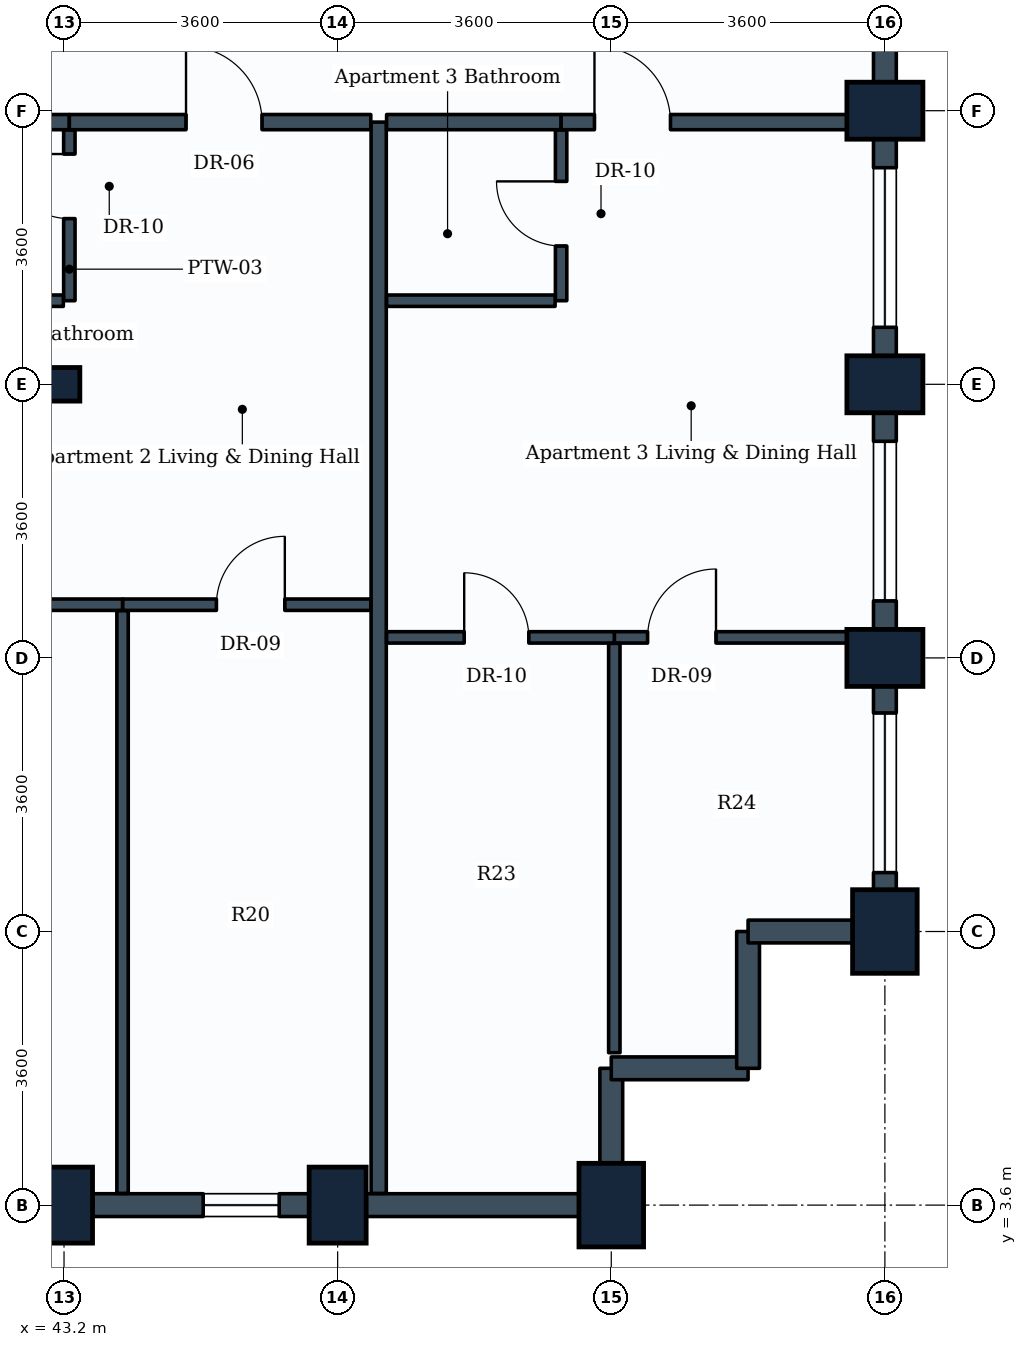
"""IFC4 building model, lengths in metres.
Left out: names, types, materials, properties, quantities, classifications, styles, units other than length and angle.
Written with IfcOpenShell. Run it as: python <this file> out.ifc"""

import sys

from ifc_helpers import new_model, si_unit, direction, frame, frame_2d, origin, origin_2d, place, context, subcontext, project, spatial, rectangle, i_section, extrude, element, fill, save


model = new_model("IFC4")
c1 = context("Model", 3, precision=1e-05, world=origin(), true_north=direction((0.0, 1.0)))
c2 = subcontext(c1, "Body", "Model", "MODEL_VIEW")
j1 = project(units=[si_unit("LENGTHUNIT", "METRE"), si_unit("PLANEANGLEUNIT", "RADIAN")], contexts=[c1])
p1 = place(None, origin())
s1 = spatial("IfcSite", under=j1, at=p1, CompositionType="ELEMENT")
p2 = place(p1, origin())
s2 = spatial("IfcBuilding", under=s1, at=p2, CompositionType="ELEMENT")
p3 = place(p2, frame((0.0, 0.0, 146.6)))
s3 = spatial("IfcBuildingStorey", under=s2, at=p3, CompositionType="ELEMENT", Elevation=146.6)
p4 = place(p3, frame((43.2, 3.6, 0.0), z_axis=(0.0, 0.0, 1.0), x_axis=(1.0, 0.0, 0.0)))
e1 = element("IfcColumn", 1, at=p4, inside=s3, PredefinedType="COLUMN", context=c2, shape_type="SweptSolid", body=[
    extrude(rectangle(XDim=0.75, YDim=1.0, at=origin_2d()), origin(), (0.0, 0.0, 1.0), 3.8),
])
p5 = place(p3, frame((43.2, 14.4, 0.0), z_axis=(0.0, 0.0, 1.0), x_axis=(1.0, 0.0, 0.0)))
e2 = element("IfcColumn", 2, at=p5, inside=s3, PredefinedType="COLUMN", context=c2, shape_type="SweptSolid", body=[
    extrude(i_section(OverallWidth=0.416, OverallDepth=0.442, WebThickness=0.025, FlangeThickness=0.041, FilletRadius=0.015, at=origin_2d()), origin(), (0.0, 0.0, 1.0), 3.8),
])
p6 = place(p3, frame((46.8, 3.6, 0.0), z_axis=(0.0, 0.0, 1.0), x_axis=(1.0, 0.0, 0.0)))
e3 = element("IfcColumn", 3, at=p6, inside=s3, PredefinedType="COLUMN", context=c2, shape_type="SweptSolid", body=[
    extrude(rectangle(XDim=0.75, YDim=1.0, at=origin_2d()), origin(), (0.0, 0.0, 1.0), 3.8),
])
for number, where, z_axis, x_axis in (
    (4, (50.4, 3.6, 0.0), (0.0, 0.0, 1.0), (1.0, 0.0, 0.0)),
    (5, (54.0, 7.2, 0.0), (0.0, 0.0, 1.0), (1.0, 0.0, 0.0)),
):
    element("IfcColumn", number, at=place(p3, frame(where, z_axis=z_axis, x_axis=x_axis)), inside=s3, PredefinedType="COLUMN", context=c2, shape_type="SweptSolid", body=[
        extrude(rectangle(XDim=0.85, YDim=1.1, at=origin_2d()), origin(), (0.0, 0.0, 1.0), 3.8),
    ])
for number, where, z_axis, x_axis in (
    (6, (54.0, 10.8, 0.0), (0.0, 0.0, 1.0), (0.0, 1.0, 0.0)),
    (7, (54.0, 14.4, 0.0), (0.0, 0.0, 1.0), (0.0, 1.0, 0.0)),
    (8, (54.0, 18.0, 0.0), (0.0, 0.0, 1.0), (0.0, 1.0, 0.0)),
):
    element("IfcColumn", number, at=place(p3, frame(where, z_axis=z_axis, x_axis=x_axis)), inside=s3, PredefinedType="COLUMN", context=c2, shape_type="SweptSolid", body=[
        extrude(rectangle(XDim=0.75, YDim=1.0, at=origin_2d()), origin(), (0.0, 0.0, 1.0), 3.8),
    ])
p7 = place(p3, frame((43.2, 3.6, 0.0), z_axis=(0.0, 0.0, 1.0), x_axis=(-1.0, 0.0, 0.0)))
e9 = element("IfcWall", 9, at=p7, inside=s3, PredefinedType="STANDARD", context=c2, shape_type="SweptSolid", body=[
    extrude(rectangle(XDim=3.6, YDim=0.3, at=frame_2d((1.8, 0.0))), origin(), (0.0, 0.0, 1.0), 2.93),
])
p8 = place(p3, frame((46.8, 3.6, 0.0), z_axis=(0.0, 0.0, 1.0), x_axis=(-1.0, 0.0, 0.0)))
e10 = element("IfcWall", 10, at=p8, inside=s3, PredefinedType="STANDARD", context=c2, shape_type="SweptSolid", body=[
    extrude(rectangle(XDim=3.6, YDim=0.3, at=frame_2d((1.8, 0.0))), origin(), (0.0, 0.0, 1.0), 2.93),
])
p9 = place(p8, frame((0.769, 0.0, 0.85)))
e11 = element("IfcOpeningElement", 11, at=p9, cuts=e10, PredefinedType="OPENING", context=c2, shape_type="SweptSolid", body=[
    extrude(rectangle(XDim=1.0, YDim=1.35, at=frame_2d((0.5, 0.675))), frame((0.0, 0.16, 0.0), z_axis=(0.0, -1.0, 0.0), x_axis=(1.0, 0.0, 0.0)), (0.0, 0.0, 1.0), 0.32),
])
p10 = place(p3, frame((50.4, 3.6, 0.0), z_axis=(0.0, 0.0, 1.0), x_axis=(-1.0, 0.0, 0.0)))
e12 = element("IfcWall", 12, at=p10, inside=s3, PredefinedType="STANDARD", context=c2, shape_type="SweptSolid", body=[
    extrude(rectangle(XDim=3.6, YDim=0.3, at=frame_2d((1.8, 0.0))), origin(), (0.0, 0.0, 1.0), 2.93),
])
p11 = place(p3, frame((50.4, 5.4, 0.0), z_axis=(0.0, 0.0, 1.0), x_axis=(0.0, -1.0, 0.0)))
e13 = element("IfcWall", 13, at=p11, inside=s3, PredefinedType="STANDARD", context=c2, shape_type="SweptSolid", body=[
    extrude(rectangle(XDim=1.8, YDim=0.3, at=frame_2d((0.9, 0.0))), origin(), (0.0, 0.0, 1.0), 2.93),
])
for number, where, z_axis, x_axis in (
    (14, (52.2, 5.4, 0.0), (0.0, 0.0, 1.0), (-1.0, 0.0, 0.0)),
    (15, (52.2, 7.2, 0.0), (0.0, 0.0, 1.0), (0.0, -1.0, 0.0)),
):
    element("IfcWall", number, at=place(p3, frame(where, z_axis=z_axis, x_axis=x_axis)), inside=s3, PredefinedType="STANDARD", context=c2, shape_type="SweptSolid", body=[
        extrude(rectangle(XDim=1.8, YDim=0.3, at=frame_2d((0.9, 0.0))), origin(), (0.0, 0.0, 1.0), 3.535),
    ])
p12 = place(p3, frame((54.0, 7.2, 0.0), z_axis=(0.0, 0.0, 1.0), x_axis=(-1.0, 0.0, 0.0)))
e16 = element("IfcWall", 16, at=p12, inside=s3, PredefinedType="STANDARD", context=c2, shape_type="SweptSolid", body=[
    extrude(rectangle(XDim=1.8, YDim=0.3, at=frame_2d((0.9, 0.0))), origin(), (0.0, 0.0, 1.0), 2.93),
])
p13 = place(p3, frame((54.0, 10.8, 0.0), z_axis=(0.0, 0.0, 1.0), x_axis=(0.0, -1.0, 0.0)))
e17 = element("IfcWall", 17, at=p13, inside=s3, PredefinedType="STANDARD", context=c2, shape_type="SweptSolid", body=[
    extrude(rectangle(XDim=3.6, YDim=0.3, at=frame_2d((1.8, 0.0))), origin(), (0.0, 0.0, 1.0), 2.93),
])
p14 = place(p13, frame((0.725, 0.0, 0.85)))
e18 = element("IfcOpeningElement", 18, at=p14, cuts=e17, PredefinedType="OPENING", context=c2, shape_type="SweptSolid", body=[
    extrude(rectangle(XDim=2.1, YDim=1.35, at=frame_2d((1.05, 0.675))), frame((0.0, 0.16, 0.0), z_axis=(0.0, -1.0, 0.0), x_axis=(1.0, 0.0, 0.0)), (0.0, 0.0, 1.0), 0.32),
])
p15 = place(p3, frame((54.0, 14.4, 0.0), z_axis=(0.0, 0.0, 1.0), x_axis=(0.0, -1.0, 0.0)))
e19 = element("IfcWall", 19, at=p15, inside=s3, PredefinedType="STANDARD", context=c2, shape_type="SweptSolid", body=[
    extrude(rectangle(XDim=3.6, YDim=0.3, at=frame_2d((1.8, 0.0))), origin(), (0.0, 0.0, 1.0), 2.93),
])
p16 = place(p15, frame((0.75, 0.0, 0.85)))
e20 = element("IfcOpeningElement", 20, at=p16, cuts=e19, PredefinedType="OPENING", context=c2, shape_type="SweptSolid", body=[
    extrude(rectangle(XDim=2.1, YDim=1.35, at=frame_2d((1.05, 0.675))), frame((0.0, 0.16, 0.0), z_axis=(0.0, -1.0, 0.0), x_axis=(1.0, 0.0, 0.0)), (0.0, 0.0, 1.0), 0.32),
])
p17 = place(p3, frame((54.0, 18.0, 0.0), z_axis=(0.0, 0.0, 1.0), x_axis=(0.0, -1.0, 0.0)))
e21 = element("IfcWall", 21, at=p17, inside=s3, PredefinedType="STANDARD", context=c2, shape_type="SweptSolid", body=[
    extrude(rectangle(XDim=3.6, YDim=0.3, at=frame_2d((1.8, 0.0))), origin(), (0.0, 0.0, 1.0), 2.93),
])
p18 = place(p17, frame((0.75, 0.0, 0.85)))
e22 = element("IfcOpeningElement", 22, at=p18, cuts=e21, PredefinedType="OPENING", context=c2, shape_type="SweptSolid", body=[
    extrude(rectangle(XDim=2.1, YDim=1.35, at=frame_2d((1.05, 0.675))), frame((0.0, 0.16, 0.0), z_axis=(0.0, -1.0, 0.0), x_axis=(1.0, 0.0, 0.0)), (0.0, 0.0, 1.0), 0.32),
])
p19 = place(p3, frame((54.0, 21.6, 0.0), z_axis=(0.0, 0.0, 1.0), x_axis=(0.0, -1.0, 0.0)))
e23 = element("IfcWall", 23, at=p19, inside=s3, PredefinedType="STANDARD", context=c2, shape_type="SweptSolid", body=[
    extrude(rectangle(XDim=3.6, YDim=0.3, at=frame_2d((1.8, 0.0))), origin(), (0.0, 0.0, 1.0), 2.93),
])
p20 = place(p3, frame((47.34, 3.754, 0.0), z_axis=(0.0, 0.0, 1.0), x_axis=(0.0, 1.0, 0.0)))
e24 = element("IfcWall", 24, at=p20, inside=s3, PredefinedType="PARTITIONING", context=c2, shape_type="SweptSolid", body=[
    extrude(rectangle(XDim=14.096, YDim=0.2, at=frame_2d((7.048, 0.0))), origin(), (0.0, 0.0, 1.0), 2.93),
])
p21 = place(p3, frame((40.974, 17.85, 0.0), z_axis=(0.0, 0.0, 1.0), x_axis=(1.0, 0.0, 0.0)))
e25 = element("IfcWall", 25, at=p21, inside=s3, PredefinedType="PARTITIONING", context=c2, shape_type="SweptSolid", body=[
    extrude(rectangle(XDim=2.296, YDim=0.2, at=frame_2d((1.148, 0.0))), origin(), (0.0, 0.0, 1.0), 3.13),
])
p22 = place(p3, frame((43.27, 15.5, 0.0), z_axis=(0.0, 0.0, 1.0), x_axis=(0.0, 1.0, 0.0)))
e26 = element("IfcWall", 26, at=p22, inside=s3, PredefinedType="PARTITIONING", context=c2, shape_type="SweptSolid", body=[
    extrude(rectangle(XDim=2.246, YDim=0.15, at=frame_2d((1.123, 0.0))), origin(), (0.0, 0.0, 1.0), 3.18),
])
p23 = place(p22, frame((1.08, 0.0, 0.0)))
e27 = element("IfcOpeningElement", 27, at=p23, cuts=e26, PredefinedType="OPENING", context=c2, shape_type="SweptSolid", body=[
    extrude(rectangle(XDim=0.85, YDim=2.1, at=frame_2d((0.425, 1.05))), frame((0.0, 0.085, 0.0), z_axis=(0.0, -1.0, 0.0), x_axis=(1.0, 0.0, 0.0)), (0.0, 0.0, 1.0), 0.17),
])
p24 = place(p3, frame((40.974, 15.5, 0.0), z_axis=(0.0, 0.0, 1.0), x_axis=(1.0, 0.0, 0.0)))
e28 = element("IfcWall", 28, at=p24, inside=s3, PredefinedType="PARTITIONING", context=c2, shape_type="SweptSolid", body=[
    extrude(rectangle(XDim=2.217, YDim=0.15, at=frame_2d((1.108, 0.0))), origin(), (0.0, 0.0, 1.0), 3.18),
])
p25 = place(p3, frame((43.27, 17.85, 0.0), z_axis=(0.0, 0.0, 1.0), x_axis=(1.0, 0.0, 0.0)))
e29 = element("IfcWall", 29, at=p25, inside=s3, PredefinedType="PARTITIONING", context=c2, shape_type="SweptSolid", body=[
    extrude(rectangle(XDim=3.966, YDim=0.2, at=frame_2d((1.983, 0.0))), origin(), (0.0, 0.0, 1.0), 3.17),
])
p26 = place(p25, frame((1.535, 0.0, 0.0)))
e30 = element("IfcOpeningElement", 30, at=p26, cuts=e29, PredefinedType="OPENING", context=c2, shape_type="SweptSolid", body=[
    extrude(rectangle(XDim=1.0, YDim=2.1, at=frame_2d((0.5, 1.05))), frame((0.0, 0.11, 0.0), z_axis=(0.0, -1.0, 0.0), x_axis=(1.0, 0.0, 0.0)), (0.0, 0.0, 1.0), 0.22),
])
p27 = place(p3, frame((43.97, 11.5, 0.0), z_axis=(0.0, 0.0, 1.0), x_axis=(1.0, 0.0, 0.0)))
e31 = element("IfcWall", 31, at=p27, inside=s3, PredefinedType="PARTITIONING", context=c2, shape_type="SweptSolid", body=[
    extrude(rectangle(XDim=3.266, YDim=0.15, at=frame_2d((1.633, 0.0))), origin(), (0.0, 0.0, 1.0), 3.17),
])
p28 = place(p27, frame((1.235, 0.0, 0.0)))
e32 = element("IfcOpeningElement", 32, at=p28, cuts=e31, PredefinedType="OPENING", context=c2, shape_type="SweptSolid", body=[
    extrude(rectangle(XDim=0.9, YDim=2.1, at=frame_2d((0.45, 1.05))), frame((0.0, 0.085, 0.0), z_axis=(0.0, -1.0, 0.0), x_axis=(1.0, 0.0, 0.0)), (0.0, 0.0, 1.0), 0.17),
])
p29 = place(p3, frame((40.974, 11.5, 0.0), z_axis=(0.0, 0.0, 1.0), x_axis=(1.0, 0.0, 0.0)))
e33 = element("IfcWall", 33, at=p29, inside=s3, PredefinedType="PARTITIONING", context=c2, shape_type="SweptSolid", body=[
    extrude(rectangle(XDim=2.996, YDim=0.15, at=frame_2d((1.498, 0.0))), origin(), (0.0, 0.0, 1.0), 3.18),
])
p30 = place(p29, frame((0.333, 0.0, 0.0)))
e34 = element("IfcOpeningElement", 34, at=p30, cuts=e33, PredefinedType="OPENING", context=c2, shape_type="SweptSolid", body=[
    extrude(rectangle(XDim=0.85, YDim=2.1, at=frame_2d((0.425, 1.05))), frame((0.0, 0.085, 0.0), z_axis=(0.0, -1.0, 0.0), x_axis=(1.0, 0.0, 0.0)), (0.0, 0.0, 1.0), 0.17),
])
p31 = place(p3, frame((43.97, 3.754, 0.0), z_axis=(0.0, 0.0, 1.0), x_axis=(0.0, 1.0, 0.0)))
e35 = element("IfcWall", 35, at=p31, inside=s3, PredefinedType="PARTITIONING", context=c2, shape_type="SweptSolid", body=[
    extrude(rectangle(XDim=7.667, YDim=0.15, at=frame_2d((3.833, 0.0))), origin(), (0.0, 0.0, 1.0), 2.93),
])
p32 = place(p3, frame((47.444, 17.85, 0.0), z_axis=(0.0, 0.0, 1.0), x_axis=(1.0, 0.0, 0.0)))
e36 = element("IfcWall", 36, at=p32, inside=s3, PredefinedType="PARTITIONING", context=c2, shape_type="SweptSolid", body=[
    extrude(rectangle(XDim=2.296, YDim=0.2, at=frame_2d((1.148, 0.0))), origin(), (0.0, 0.0, 1.0), 3.535),
])
p33 = place(p3, frame((49.74, 15.5, 0.0), z_axis=(0.0, 0.0, 1.0), x_axis=(0.0, 1.0, 0.0)))
e37 = element("IfcWall", 37, at=p33, inside=s3, PredefinedType="PARTITIONING", context=c2, shape_type="SweptSolid", body=[
    extrude(rectangle(XDim=2.246, YDim=0.15, at=frame_2d((1.123, 0.0))), origin(), (0.0, 0.0, 1.0), 3.535),
])
p34 = place(p33, frame((0.72, 0.0, 0.0)))
e38 = element("IfcOpeningElement", 38, at=p34, cuts=e37, PredefinedType="OPENING", context=c2, shape_type="SweptSolid", body=[
    extrude(rectangle(XDim=0.85, YDim=2.1, at=frame_2d((0.425, 1.05))), frame((0.0, 0.085, 0.0), z_axis=(0.0, -1.0, 0.0), x_axis=(1.0, 0.0, 0.0)), (0.0, 0.0, 1.0), 0.17),
])
p35 = place(p3, frame((47.444, 15.5, 0.0), z_axis=(0.0, 0.0, 1.0), x_axis=(1.0, 0.0, 0.0)))
e39 = element("IfcWall", 39, at=p35, inside=s3, PredefinedType="PARTITIONING", context=c2, shape_type="SweptSolid", body=[
    extrude(rectangle(XDim=2.217, YDim=0.15, at=frame_2d((1.108, 0.0))), origin(), (0.0, 0.0, 1.0), 3.535),
])
p36 = place(p3, frame((49.74, 17.85, 0.0), z_axis=(0.0, 0.0, 1.0), x_axis=(1.0, 0.0, 0.0)))
e40 = element("IfcWall", 40, at=p36, inside=s3, PredefinedType="PARTITIONING", context=c2, shape_type="SweptSolid", body=[
    extrude(rectangle(XDim=4.106, YDim=0.2, at=frame_2d((2.053, 0.0))), origin(), (0.0, 0.0, 1.0), 2.93),
])
p37 = place(p36, frame((0.439, 0.0, 0.0)))
e41 = element("IfcOpeningElement", 41, at=p37, cuts=e40, PredefinedType="OPENING", context=c2, shape_type="SweptSolid", body=[
    extrude(rectangle(XDim=1.0, YDim=2.1, at=frame_2d((0.5, 1.05))), frame((0.0, 0.11, 0.0), z_axis=(0.0, -1.0, 0.0), x_axis=(1.0, 0.0, 0.0)), (0.0, 0.0, 1.0), 0.22),
])
p38 = place(p3, frame((50.44, 11.07, 0.0), z_axis=(0.0, 0.0, 1.0), x_axis=(1.0, 0.0, 0.0)))
e42 = element("IfcWall", 42, at=p38, inside=s3, PredefinedType="PARTITIONING", context=c2, shape_type="SweptSolid", body=[
    extrude(rectangle(XDim=3.406, YDim=0.15, at=frame_2d((1.703, 0.0))), origin(), (0.0, 0.0, 1.0), 2.93),
])
p39 = place(p38, frame((0.438, 0.0, 0.0)))
e43 = element("IfcOpeningElement", 43, at=p39, cuts=e42, PredefinedType="OPENING", context=c2, shape_type="SweptSolid", body=[
    extrude(rectangle(XDim=0.9, YDim=2.1, at=frame_2d((0.45, 1.05))), frame((0.0, 0.085, 0.0), z_axis=(0.0, -1.0, 0.0), x_axis=(1.0, 0.0, 0.0)), (0.0, 0.0, 1.0), 0.17),
])
p40 = place(p3, frame((47.444, 11.07, 0.0), z_axis=(0.0, 0.0, 1.0), x_axis=(1.0, 0.0, 0.0)))
e44 = element("IfcWall", 44, at=p40, inside=s3, PredefinedType="PARTITIONING", context=c2, shape_type="SweptSolid", body=[
    extrude(rectangle(XDim=2.996, YDim=0.15, at=frame_2d((1.498, 0.0))), origin(), (0.0, 0.0, 1.0), 3.535),
])
p41 = place(p40, frame((1.021, 0.0, 0.0)))
e45 = element("IfcOpeningElement", 45, at=p41, cuts=e44, PredefinedType="OPENING", context=c2, shape_type="SweptSolid", body=[
    extrude(rectangle(XDim=0.85, YDim=2.1, at=frame_2d((0.425, 1.05))), frame((0.0, 0.085, 0.0), z_axis=(0.0, -1.0, 0.0), x_axis=(1.0, 0.0, 0.0)), (0.0, 0.0, 1.0), 0.17),
])
p42 = place(p3, frame((50.44, 5.605, 0.0), z_axis=(0.0, 0.0, 1.0), x_axis=(0.0, 1.0, 0.0)))
e46 = element("IfcWall", 46, at=p42, inside=s3, PredefinedType="PARTITIONING", context=c2, shape_type="SweptSolid", body=[
    extrude(rectangle(XDim=5.386, YDim=0.15, at=frame_2d((2.693, 0.0))), origin(), (0.0, 0.0, 1.0), 3.535),
])
p43 = place(p14, origin())
e47 = element("IfcWindow", 47, at=p43, inside=s3, PartitioningType="SINGLE_PANEL", PredefinedType="WINDOW", context=c2, shape_type="SweptSolid", body=[
    extrude(rectangle(XDim=2.1, YDim=1.35, at=frame_2d((1.05, 0.675))), frame((0.0, 0.03, 0.0), z_axis=(0.0, -1.0, 0.0), x_axis=(1.0, 0.0, 0.0)), (0.0, 0.0, 1.0), 0.06),
])
fill(e18, e47)
p44 = place(p16, origin())
e48 = element("IfcWindow", 48, at=p44, inside=s3, PartitioningType="SINGLE_PANEL", PredefinedType="WINDOW", context=c2, shape_type="SweptSolid", body=[
    extrude(rectangle(XDim=2.1, YDim=1.35, at=frame_2d((1.05, 0.675))), frame((0.0, 0.03, 0.0), z_axis=(0.0, -1.0, 0.0), x_axis=(1.0, 0.0, 0.0)), (0.0, 0.0, 1.0), 0.06),
])
fill(e20, e48)
p45 = place(p18, origin())
e49 = element("IfcWindow", 49, at=p45, inside=s3, PartitioningType="SINGLE_PANEL", PredefinedType="WINDOW", context=c2, shape_type="SweptSolid", body=[
    extrude(rectangle(XDim=2.1, YDim=1.35, at=frame_2d((1.05, 0.675))), frame((0.0, 0.03, 0.0), z_axis=(0.0, -1.0, 0.0), x_axis=(1.0, 0.0, 0.0)), (0.0, 0.0, 1.0), 0.06),
])
fill(e22, e49)
p46 = place(p23, origin())
e50 = element("IfcDoor", 50, at=p46, inside=s3, OperationType="SINGLE_SWING_RIGHT", PredefinedType="DOOR", context=c2, shape_type="SweptSolid", body=[
    extrude(rectangle(XDim=0.85, YDim=2.1, at=frame_2d((0.425, 1.05))), frame((0.0, 0.025, 0.0), z_axis=(0.0, -1.0, 0.0), x_axis=(1.0, 0.0, 0.0)), (0.0, 0.0, 1.0), 0.05),
])
fill(e27, e50)
p47 = place(p26, origin())
e51 = element("IfcDoor", 51, at=p47, inside=s3, OperationType="SINGLE_SWING_LEFT", PredefinedType="DOOR", context=c2, shape_type="SweptSolid", body=[
    extrude(rectangle(XDim=1.0, YDim=2.1, at=frame_2d((0.5, 1.05))), frame((0.0, 0.025, 0.0), z_axis=(0.0, -1.0, 0.0), x_axis=(1.0, 0.0, 0.0)), (0.0, 0.0, 1.0), 0.05),
])
fill(e30, e51)
p48 = place(p28, origin())
e52 = element("IfcDoor", 52, at=p48, inside=s3, OperationType="SINGLE_SWING_RIGHT", PredefinedType="DOOR", context=c2, shape_type="SweptSolid", body=[
    extrude(rectangle(XDim=0.9, YDim=2.1, at=frame_2d((0.45, 1.05))), frame((0.0, 0.025, 0.0), z_axis=(0.0, -1.0, 0.0), x_axis=(1.0, 0.0, 0.0)), (0.0, 0.0, 1.0), 0.05),
])
fill(e32, e52)
p49 = place(p34, origin())
e53 = element("IfcDoor", 53, at=p49, inside=s3, OperationType="SINGLE_SWING_RIGHT", PredefinedType="DOOR", context=c2, shape_type="SweptSolid", body=[
    extrude(rectangle(XDim=0.85, YDim=2.1, at=frame_2d((0.425, 1.05))), frame((0.0, 0.025, 0.0), z_axis=(0.0, -1.0, 0.0), x_axis=(1.0, 0.0, 0.0)), (0.0, 0.0, 1.0), 0.05),
])
fill(e38, e53)
p50 = place(p37, origin())
e54 = element("IfcDoor", 54, at=p50, inside=s3, OperationType="SINGLE_SWING_LEFT", PredefinedType="DOOR", context=c2, shape_type="SweptSolid", body=[
    extrude(rectangle(XDim=1.0, YDim=2.1, at=frame_2d((0.5, 1.05))), frame((0.0, 0.025, 0.0), z_axis=(0.0, -1.0, 0.0), x_axis=(1.0, 0.0, 0.0)), (0.0, 0.0, 1.0), 0.05),
])
fill(e41, e54)
p51 = place(p39, origin())
e55 = element("IfcDoor", 55, at=p51, inside=s3, OperationType="SINGLE_SWING_RIGHT", PredefinedType="DOOR", context=c2, shape_type="SweptSolid", body=[
    extrude(rectangle(XDim=0.9, YDim=2.1, at=frame_2d((0.45, 1.05))), frame((0.0, 0.025, 0.0), z_axis=(0.0, -1.0, 0.0), x_axis=(1.0, 0.0, 0.0)), (0.0, 0.0, 1.0), 0.05),
])
fill(e43, e55)
p52 = place(p41, origin())
e56 = element("IfcDoor", 56, at=p52, inside=s3, OperationType="SINGLE_SWING_LEFT", PredefinedType="DOOR", context=c2, shape_type="SweptSolid", body=[
    extrude(rectangle(XDim=0.85, YDim=2.1, at=frame_2d((0.425, 1.05))), frame((0.0, 0.025, 0.0), z_axis=(0.0, -1.0, 0.0), x_axis=(1.0, 0.0, 0.0)), (0.0, 0.0, 1.0), 0.05),
])
fill(e45, e56)
p53 = place(p9, origin())
e57 = element("IfcWindow", 57, at=p53, inside=s3, PartitioningType="SINGLE_PANEL", PredefinedType="WINDOW", context=c2, shape_type="SweptSolid", body=[
    extrude(rectangle(XDim=1.0, YDim=1.35, at=frame_2d((0.5, 0.675))), frame((0.0, 0.03, 0.0), z_axis=(0.0, -1.0, 0.0), x_axis=(1.0, 0.0, 0.0)), (0.0, 0.0, 1.0), 0.06),
])
fill(e11, e57)
save(model, sys.argv[1])
